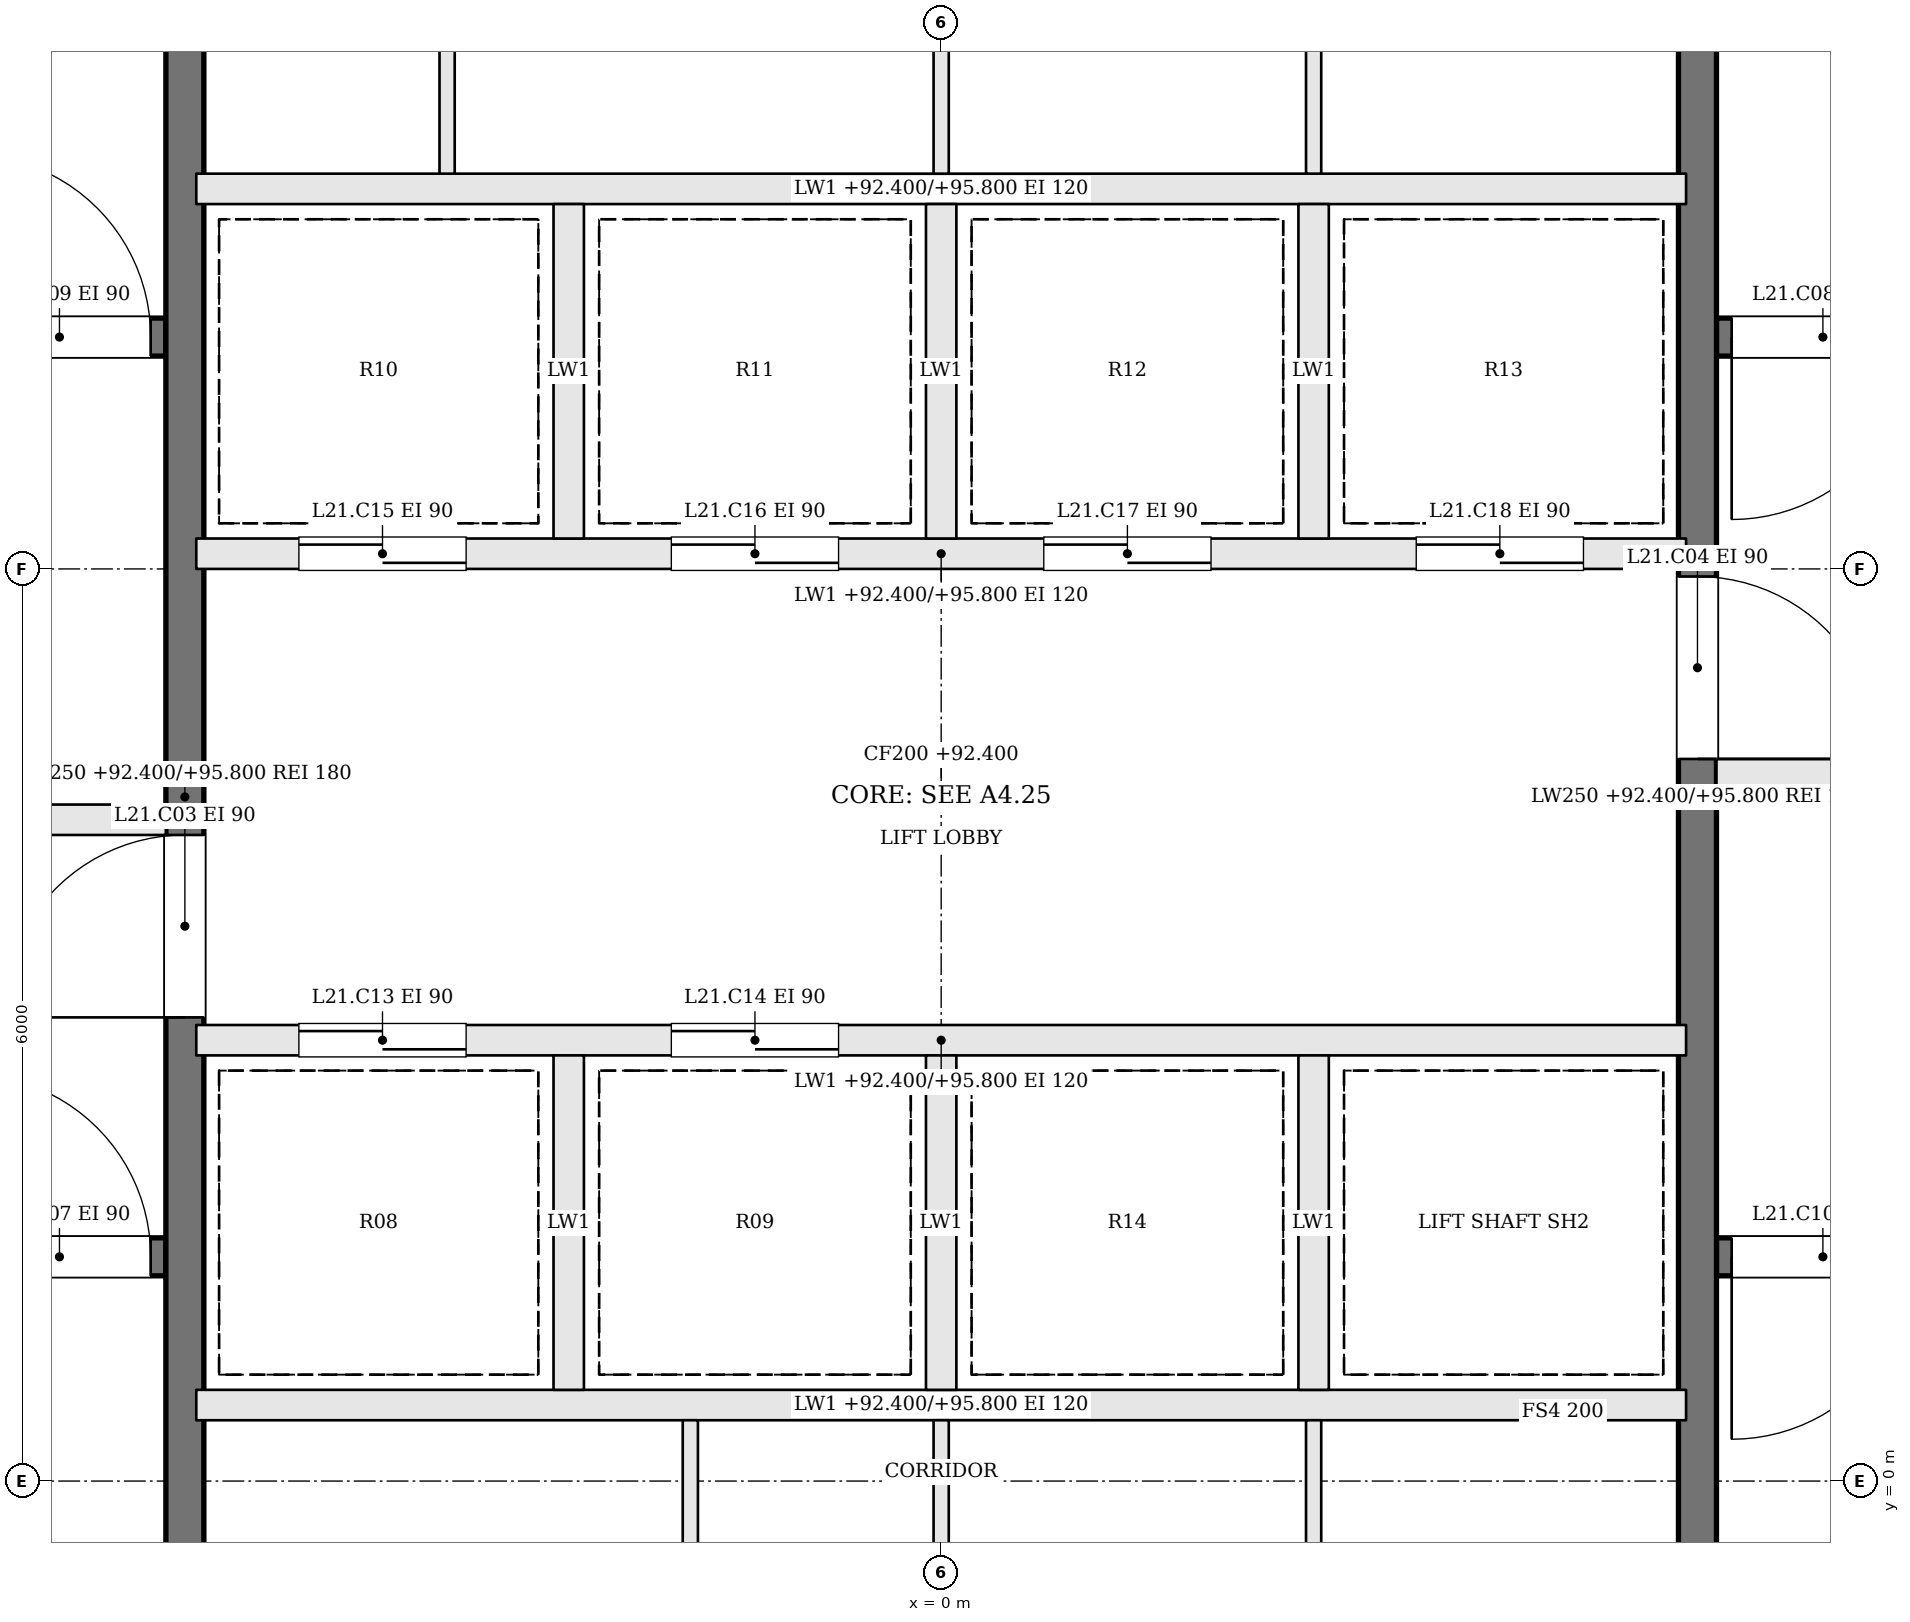
"""IFC4 building model, lengths in metres.
Left out: names, types, materials, properties, quantities, classifications, styles, units other than length and angle.
Written with IfcOpenShell. Run it as: python <this file> out.ifc"""

import sys

from ifc_helpers import new_model, si_unit, direction, frame, frame_2d, origin, place, context, subcontext, project, spatial, rectangle, extrude, element, fill, save


model = new_model("IFC4")
c1 = context("Model", 3, precision=1e-05, world=origin(), true_north=direction((0.0, 1.0)))
c2 = subcontext(c1, "Body", "Model", "MODEL_VIEW")
j1 = project(units=[si_unit("LENGTHUNIT", "METRE"), si_unit("PLANEANGLEUNIT", "RADIAN")], contexts=[c1])
p1 = place(None, origin())
s1 = spatial("IfcSite", under=j1, at=p1, CompositionType="ELEMENT")
p2 = place(p1, origin())
s2 = spatial("IfcBuilding", under=s1, at=p2, CompositionType="ELEMENT")
p3 = place(p2, frame((0.0, 0.0, 92.4)))
s3 = spatial("IfcBuildingStorey", under=s2, at=p3, CompositionType="ELEMENT", Elevation=92.4)
p4 = place(p3, frame((-11.9, 1.475, 0.0), z_axis=(0.0, 0.0, 1.0), x_axis=(1.0, 0.0, 0.0)))
e1 = element("IfcWall", 1, at=p4, inside=s3, PredefinedType="SOLIDWALL", context=c2, shape_type="SweptSolid", body=[
    extrude(rectangle(XDim=6.8, YDim=0.25, at=frame_2d((3.4, 0.0))), origin(), (0.0, 0.0, 1.0), 3.4),
])
p5 = place(p4, frame((5.5, 0.0, 0.0)))
e2 = element("IfcOpeningElement", 2, at=p5, cuts=e1, PredefinedType="OPENING", context=c2, shape_type="SweptSolid", body=[
    extrude(rectangle(XDim=1.2, YDim=2.1, at=frame_2d((0.6, 1.05))), frame((0.0, 0.135, 0.0), z_axis=(0.0, -1.0, 0.0), x_axis=(1.0, 0.0, 0.0)), (0.0, 0.0, 1.0), 0.27),
])
p6 = place(p3, frame((11.9, 7.525, 0.0), z_axis=(0.0, 0.0, 1.0), x_axis=(-1.0, 0.0, 0.0)))
e3 = element("IfcWall", 3, at=p6, inside=s3, PredefinedType="SOLIDWALL", context=c2, shape_type="SweptSolid", body=[
    extrude(rectangle(XDim=6.8, YDim=0.25, at=frame_2d((3.4, 0.0))), origin(), (0.0, 0.0, 1.0), 3.4),
])
p7 = place(p6, frame((5.5, 0.0, 0.0)))
e4 = element("IfcOpeningElement", 4, at=p7, cuts=e3, PredefinedType="OPENING", context=c2, shape_type="SweptSolid", body=[
    extrude(rectangle(XDim=1.2, YDim=2.1, at=frame_2d((0.6, 1.05))), frame((0.0, 0.135, 0.0), z_axis=(0.0, -1.0, 0.0), x_axis=(1.0, 0.0, 0.0)), (0.0, 0.0, 1.0), 0.27),
])
p8 = place(p3, frame((-11.9, 4.35, 0.0), z_axis=(0.0, 0.0, 1.0), x_axis=(1.0, 0.0, 0.0)))
e5 = element("IfcWall", 5, at=p8, inside=s3, PredefinedType="SOLIDWALL", context=c2, shape_type="SweptSolid", body=[
    extrude(rectangle(XDim=6.8, YDim=0.2, at=frame_2d((3.4, 0.0))), origin(), (0.0, 0.0, 1.0), 3.4),
])
p9 = place(p8, frame((4.1, 0.0, 0.0)))
e6 = element("IfcOpeningElement", 6, at=p9, cuts=e5, PredefinedType="OPENING", context=c2, shape_type="SweptSolid", body=[
    extrude(rectangle(XDim=1.2, YDim=2.1, at=frame_2d((0.6, 1.05))), frame((0.0, 0.11, 0.0), z_axis=(0.0, -1.0, 0.0), x_axis=(1.0, 0.0, 0.0)), (0.0, 0.0, 1.0), 0.22),
])
p10 = place(p8, frame((0.8, 0.0, 0.0)))
e7 = element("IfcOpeningElement", 7, at=p10, cuts=e5, PredefinedType="OPENING", context=c2, shape_type="SweptSolid", body=[
    extrude(rectangle(XDim=1.2, YDim=2.1, at=frame_2d((0.6, 1.05))), frame((0.0, 0.11, 0.0), z_axis=(0.0, -1.0, 0.0), x_axis=(1.0, 0.0, 0.0)), (0.0, 0.0, 1.0), 0.22),
])
p11 = place(p3, frame((11.9, 4.65, 0.0), z_axis=(0.0, 0.0, 1.0), x_axis=(-1.0, 0.0, 0.0)))
e8 = element("IfcWall", 8, at=p11, inside=s3, PredefinedType="SOLIDWALL", context=c2, shape_type="SweptSolid", body=[
    extrude(rectangle(XDim=6.8, YDim=0.2, at=frame_2d((3.4, 0.0))), origin(), (0.0, 0.0, 1.0), 3.4),
])
p12 = place(p11, frame((4.1, 0.0, 0.0)))
e9 = element("IfcOpeningElement", 9, at=p12, cuts=e8, PredefinedType="OPENING", context=c2, shape_type="SweptSolid", body=[
    extrude(rectangle(XDim=1.2, YDim=2.1, at=frame_2d((0.6, 1.05))), frame((0.0, 0.11, 0.0), z_axis=(0.0, -1.0, 0.0), x_axis=(1.0, 0.0, 0.0)), (0.0, 0.0, 1.0), 0.22),
])
p13 = place(p11, frame((0.8, 0.0, 0.0)))
e10 = element("IfcOpeningElement", 10, at=p13, cuts=e8, PredefinedType="OPENING", context=c2, shape_type="SweptSolid", body=[
    extrude(rectangle(XDim=1.2, YDim=2.1, at=frame_2d((0.6, 1.05))), frame((0.0, 0.11, 0.0), z_axis=(0.0, -1.0, 0.0), x_axis=(1.0, 0.0, 0.0)), (0.0, 0.0, 1.0), 0.22),
])
p14 = place(p3, frame((-11.9, 7.525, 0.0), z_axis=(0.0, 0.0, 1.0), x_axis=(1.0, 0.0, 0.0)))
e11 = element("IfcWall", 11, at=p14, inside=s3, PredefinedType="SOLIDWALL", context=c2, shape_type="SweptSolid", body=[
    extrude(rectangle(XDim=6.8, YDim=0.25, at=frame_2d((3.4, 0.0))), origin(), (0.0, 0.0, 1.0), 3.4),
])
p15 = place(p14, frame((5.5, 0.0, 0.0)))
e12 = element("IfcOpeningElement", 12, at=p15, cuts=e11, PredefinedType="OPENING", context=c2, shape_type="SweptSolid", body=[
    extrude(rectangle(XDim=1.2, YDim=2.1, at=frame_2d((0.6, 1.05))), frame((0.0, 0.135, 0.0), z_axis=(0.0, -1.0, 0.0), x_axis=(1.0, 0.0, 0.0)), (0.0, 0.0, 1.0), 0.27),
])
p16 = place(p3, frame((11.9, 1.475, 0.0), z_axis=(0.0, 0.0, 1.0), x_axis=(-1.0, 0.0, 0.0)))
e13 = element("IfcWall", 13, at=p16, inside=s3, PredefinedType="SOLIDWALL", context=c2, shape_type="SweptSolid", body=[
    extrude(rectangle(XDim=6.8, YDim=0.25, at=frame_2d((3.4, 0.0))), origin(), (0.0, 0.0, 1.0), 3.4),
])
p17 = place(p16, frame((5.5, 0.0, 0.0)))
e14 = element("IfcOpeningElement", 14, at=p17, cuts=e13, PredefinedType="OPENING", context=c2, shape_type="SweptSolid", body=[
    extrude(rectangle(XDim=1.2, YDim=2.1, at=frame_2d((0.6, 1.05))), frame((0.0, 0.135, 0.0), z_axis=(0.0, -1.0, 0.0), x_axis=(1.0, 0.0, 0.0)), (0.0, 0.0, 1.0), 0.27),
])
p18 = place(p3, frame((-4.975, -1.9, 0.0), z_axis=(0.0, 0.0, 1.0), x_axis=(0.0, 1.0, 0.0)))
e15 = element("IfcWall", 15, at=p18, inside=s3, PredefinedType="SOLIDWALL", context=c2, shape_type="SweptSolid", body=[
    extrude(rectangle(XDim=12.8, YDim=0.25, at=frame_2d((6.4, 0.0))), origin(), (0.0, 0.0, 1.0), 3.4),
])
p19 = place(p18, frame((4.95, 0.0, 0.0)))
e16 = element("IfcOpeningElement", 16, at=p19, cuts=e15, PredefinedType="OPENING", context=c2, shape_type="SweptSolid", body=[
    extrude(rectangle(XDim=1.2, YDim=2.1, at=frame_2d((0.6, 1.05))), frame((0.0, 0.135, 0.0), z_axis=(0.0, -1.0, 0.0), x_axis=(1.0, 0.0, 0.0)), (0.0, 0.0, 1.0), 0.27),
])
p20 = place(p3, frame((4.975, 10.9, 0.0), z_axis=(0.0, 0.0, 1.0), x_axis=(0.0, -1.0, 0.0)))
e17 = element("IfcWall", 17, at=p20, inside=s3, PredefinedType="SOLIDWALL", context=c2, shape_type="SweptSolid", body=[
    extrude(rectangle(XDim=12.8, YDim=0.25, at=frame_2d((6.4, 0.0))), origin(), (0.0, 0.0, 1.0), 3.4),
])
p21 = place(p20, frame((4.95, 0.0, 0.0)))
e18 = element("IfcOpeningElement", 18, at=p21, cuts=e17, PredefinedType="OPENING", context=c2, shape_type="SweptSolid", body=[
    extrude(rectangle(XDim=1.2, YDim=2.1, at=frame_2d((0.6, 1.05))), frame((0.0, 0.135, 0.0), z_axis=(0.0, -1.0, 0.0), x_axis=(1.0, 0.0, 0.0)), (0.0, 0.0, 1.0), 0.27),
])
p22 = place(p3, frame((-4.9, 0.5, 0.0), z_axis=(0.0, 0.0, 1.0), x_axis=(1.0, 0.0, 0.0)))
e19 = element("IfcWall", 19, at=p22, inside=s3, PredefinedType="SOLIDWALL", context=c2, shape_type="SweptSolid", body=[
    extrude(rectangle(XDim=9.8, YDim=0.2, at=frame_2d((4.9, 0.0))), origin(), (0.0, 0.0, 1.0), 3.4),
])
p23 = place(p3, frame((-4.9, 2.9, 0.0), z_axis=(0.0, 0.0, 1.0), x_axis=(1.0, 0.0, 0.0)))
e20 = element("IfcWall", 20, at=p23, inside=s3, PredefinedType="SOLIDWALL", context=c2, shape_type="SweptSolid", body=[
    extrude(rectangle(XDim=9.8, YDim=0.2, at=frame_2d((4.9, 0.0))), origin(), (0.0, 0.0, 1.0), 3.4),
])
p24 = place(p23, frame((0.675, 0.0, 0.0)))
e21 = element("IfcOpeningElement", 21, at=p24, cuts=e20, PredefinedType="OPENING", context=c2, shape_type="SweptSolid", body=[
    extrude(rectangle(XDim=1.1, YDim=2.1, at=frame_2d((0.55, 1.05))), frame((0.0, 0.11, 0.0), z_axis=(0.0, -1.0, 0.0), x_axis=(1.0, 0.0, 0.0)), (0.0, 0.0, 1.0), 0.22),
])
p25 = place(p23, frame((3.125, 0.0, 0.0)))
e22 = element("IfcOpeningElement", 22, at=p25, cuts=e20, PredefinedType="OPENING", context=c2, shape_type="SweptSolid", body=[
    extrude(rectangle(XDim=1.1, YDim=2.1, at=frame_2d((0.55, 1.05))), frame((0.0, 0.11, 0.0), z_axis=(0.0, -1.0, 0.0), x_axis=(1.0, 0.0, 0.0)), (0.0, 0.0, 1.0), 0.22),
])
p26 = place(p3, frame((-4.9, 6.1, 0.0), z_axis=(0.0, 0.0, 1.0), x_axis=(1.0, 0.0, 0.0)))
e23 = element("IfcWall", 23, at=p26, inside=s3, PredefinedType="SOLIDWALL", context=c2, shape_type="SweptSolid", body=[
    extrude(rectangle(XDim=9.8, YDim=0.2, at=frame_2d((4.9, 0.0))), origin(), (0.0, 0.0, 1.0), 3.4),
])
p27 = place(p26, frame((0.675, 0.0, 0.0)))
e24 = element("IfcOpeningElement", 24, at=p27, cuts=e23, PredefinedType="OPENING", context=c2, shape_type="SweptSolid", body=[
    extrude(rectangle(XDim=1.1, YDim=2.1, at=frame_2d((0.55, 1.05))), frame((0.0, 0.11, 0.0), z_axis=(0.0, -1.0, 0.0), x_axis=(1.0, 0.0, 0.0)), (0.0, 0.0, 1.0), 0.22),
])
p28 = place(p26, frame((3.125, 0.0, 0.0)))
e25 = element("IfcOpeningElement", 25, at=p28, cuts=e23, PredefinedType="OPENING", context=c2, shape_type="SweptSolid", body=[
    extrude(rectangle(XDim=1.1, YDim=2.1, at=frame_2d((0.55, 1.05))), frame((0.0, 0.11, 0.0), z_axis=(0.0, -1.0, 0.0), x_axis=(1.0, 0.0, 0.0)), (0.0, 0.0, 1.0), 0.22),
])
p29 = place(p26, frame((5.575, 0.0, 0.0)))
e26 = element("IfcOpeningElement", 26, at=p29, cuts=e23, PredefinedType="OPENING", context=c2, shape_type="SweptSolid", body=[
    extrude(rectangle(XDim=1.1, YDim=2.1, at=frame_2d((0.55, 1.05))), frame((0.0, 0.11, 0.0), z_axis=(0.0, -1.0, 0.0), x_axis=(1.0, 0.0, 0.0)), (0.0, 0.0, 1.0), 0.22),
])
p30 = place(p26, frame((8.025, 0.0, 0.0)))
e27 = element("IfcOpeningElement", 27, at=p30, cuts=e23, PredefinedType="OPENING", context=c2, shape_type="SweptSolid", body=[
    extrude(rectangle(XDim=1.1, YDim=2.1, at=frame_2d((0.55, 1.05))), frame((0.0, 0.11, 0.0), z_axis=(0.0, -1.0, 0.0), x_axis=(1.0, 0.0, 0.0)), (0.0, 0.0, 1.0), 0.22),
])
p31 = place(p3, frame((-4.9, 8.5, 0.0), z_axis=(0.0, 0.0, 1.0), x_axis=(1.0, 0.0, 0.0)))
e28 = element("IfcWall", 28, at=p31, inside=s3, PredefinedType="SOLIDWALL", context=c2, shape_type="SweptSolid", body=[
    extrude(rectangle(XDim=9.8, YDim=0.2, at=frame_2d((4.9, 0.0))), origin(), (0.0, 0.0, 1.0), 3.4),
])
for number, where, z_axis, x_axis in (
    (29, (-2.45, 0.6, 0.0), (0.0, 0.0, 1.0), (0.0, 1.0, 0.0)),
    (30, (0.0, 0.6, 0.0), (0.0, 0.0, 1.0), (0.0, 1.0, 0.0)),
    (31, (2.45, 0.6, 0.0), (0.0, 0.0, 1.0), (0.0, 1.0, 0.0)),
    (32, (-2.45, 6.2, 0.0), (0.0, 0.0, 1.0), (0.0, 1.0, 0.0)),
    (33, (0.0, 6.2, 0.0), (0.0, 0.0, 1.0), (0.0, 1.0, 0.0)),
    (34, (2.45, 6.2, 0.0), (0.0, 0.0, 1.0), (0.0, 1.0, 0.0)),
):
    element("IfcWall", number, at=place(p3, frame(where, z_axis=z_axis, x_axis=x_axis)), inside=s3, PredefinedType="SOLIDWALL", context=c2, shape_type="SweptSolid", body=[
        extrude(rectangle(XDim=2.2, YDim=0.2, at=frame_2d((1.1, 0.0))), origin(), (0.0, 0.0, 1.0), 3.4),
    ])
for number, where, z_axis, x_axis in (
    (35, (-1.65, -1.9, 0.0), (0.0, 0.0, 1.0), (0.0, 1.0, 0.0)),
    (36, (0.0, -1.9, 0.0), (0.0, 0.0, 1.0), (0.0, 1.0, 0.0)),
    (37, (2.45, -1.9, 0.0), (0.0, 0.0, 1.0), (0.0, 1.0, 0.0)),
    (38, (-3.25, 8.6, 0.0), (0.0, 0.0, 1.0), (0.0, 1.0, 0.0)),
    (39, (0.0, 8.6, 0.0), (0.0, 0.0, 1.0), (0.0, 1.0, 0.0)),
    (40, (2.45, 8.6, 0.0), (0.0, 0.0, 1.0), (0.0, 1.0, 0.0)),
):
    element("IfcWall", number, at=place(p3, frame(where, z_axis=z_axis, x_axis=x_axis)), inside=s3, PredefinedType="PARTITIONING", context=c2, shape_type="SweptSolid", body=[
        extrude(rectangle(XDim=2.3, YDim=0.1, at=frame_2d((1.15, 0.0))), origin(), (0.0, 0.0, 1.0), 3.4),
    ])
p32 = place(p19, origin())
e41 = element("IfcDoor", 41, at=p32, inside=s3, OperationType="SINGLE_SWING_LEFT", PredefinedType="DOOR", context=c2, shape_type="SweptSolid", body=[
    extrude(rectangle(XDim=1.2, YDim=2.1, at=frame_2d((0.6, 1.05))), frame((0.0, 0.025, 0.0), z_axis=(0.0, -1.0, 0.0), x_axis=(1.0, 0.0, 0.0)), (0.0, 0.0, 1.0), 0.05),
])
fill(e16, e41)
p33 = place(p21, origin())
e42 = element("IfcDoor", 42, at=p33, inside=s3, OperationType="SINGLE_SWING_RIGHT", PredefinedType="DOOR", context=c2, shape_type="SweptSolid", body=[
    extrude(rectangle(XDim=1.2, YDim=2.1, at=frame_2d((0.6, 1.05))), frame((0.0, 0.025, 0.0), z_axis=(0.0, -1.0, 0.0), x_axis=(1.0, 0.0, 0.0)), (0.0, 0.0, 1.0), 0.05),
])
fill(e18, e42)
p34 = place(p5, origin())
e43 = element("IfcDoor", 43, at=p34, inside=s3, OperationType="SINGLE_SWING_LEFT", PredefinedType="DOOR", context=c2, shape_type="SweptSolid", body=[
    extrude(rectangle(XDim=1.2, YDim=2.1, at=frame_2d((0.6, 1.05))), frame((0.0, 0.025, 0.0), z_axis=(0.0, -1.0, 0.0), x_axis=(1.0, 0.0, 0.0)), (0.0, 0.0, 1.0), 0.05),
])
fill(e2, e43)
p35 = place(p7, origin())
e44 = element("IfcDoor", 44, at=p35, inside=s3, OperationType="SINGLE_SWING_RIGHT", PredefinedType="DOOR", context=c2, shape_type="SweptSolid", body=[
    extrude(rectangle(XDim=1.2, YDim=2.1, at=frame_2d((0.6, 1.05))), frame((0.0, 0.025, 0.0), z_axis=(0.0, -1.0, 0.0), x_axis=(1.0, 0.0, 0.0)), (0.0, 0.0, 1.0), 0.05),
])
fill(e4, e44)
p36 = place(p15, origin())
e45 = element("IfcDoor", 45, at=p36, inside=s3, OperationType="SINGLE_SWING_LEFT", PredefinedType="DOOR", context=c2, shape_type="SweptSolid", body=[
    extrude(rectangle(XDim=1.2, YDim=2.1, at=frame_2d((0.6, 1.05))), frame((0.0, 0.025, 0.0), z_axis=(0.0, -1.0, 0.0), x_axis=(1.0, 0.0, 0.0)), (0.0, 0.0, 1.0), 0.05),
])
fill(e12, e45)
p37 = place(p17, origin())
e46 = element("IfcDoor", 46, at=p37, inside=s3, OperationType="SINGLE_SWING_RIGHT", PredefinedType="DOOR", context=c2, shape_type="SweptSolid", body=[
    extrude(rectangle(XDim=1.2, YDim=2.1, at=frame_2d((0.6, 1.05))), frame((0.0, 0.025, 0.0), z_axis=(0.0, -1.0, 0.0), x_axis=(1.0, 0.0, 0.0)), (0.0, 0.0, 1.0), 0.05),
])
fill(e14, e46)
p38 = place(p24, origin())
e47 = element("IfcDoor", 47, at=p38, inside=s3, OperationType="SLIDING_TO_RIGHT", PredefinedType="DOOR", context=c2, shape_type="SweptSolid", body=[
    extrude(rectangle(XDim=1.1, YDim=2.1, at=frame_2d((0.55, 1.05))), frame((0.0, 0.025, 0.0), z_axis=(0.0, -1.0, 0.0), x_axis=(1.0, 0.0, 0.0)), (0.0, 0.0, 1.0), 0.05),
])
fill(e21, e47)
p39 = place(p25, origin())
e48 = element("IfcDoor", 48, at=p39, inside=s3, OperationType="SLIDING_TO_LEFT", PredefinedType="DOOR", context=c2, shape_type="SweptSolid", body=[
    extrude(rectangle(XDim=1.1, YDim=2.1, at=frame_2d((0.55, 1.05))), frame((0.0, 0.025, 0.0), z_axis=(0.0, -1.0, 0.0), x_axis=(1.0, 0.0, 0.0)), (0.0, 0.0, 1.0), 0.05),
])
fill(e22, e48)
p40 = place(p27, origin())
e49 = element("IfcDoor", 49, at=p40, inside=s3, OperationType="SLIDING_TO_RIGHT", PredefinedType="DOOR", context=c2, shape_type="SweptSolid", body=[
    extrude(rectangle(XDim=1.1, YDim=2.1, at=frame_2d((0.55, 1.05))), frame((0.0, 0.025, 0.0), z_axis=(0.0, -1.0, 0.0), x_axis=(1.0, 0.0, 0.0)), (0.0, 0.0, 1.0), 0.05),
])
fill(e24, e49)
p41 = place(p28, origin())
e50 = element("IfcDoor", 50, at=p41, inside=s3, OperationType="SLIDING_TO_LEFT", PredefinedType="DOOR", context=c2, shape_type="SweptSolid", body=[
    extrude(rectangle(XDim=1.1, YDim=2.1, at=frame_2d((0.55, 1.05))), frame((0.0, 0.025, 0.0), z_axis=(0.0, -1.0, 0.0), x_axis=(1.0, 0.0, 0.0)), (0.0, 0.0, 1.0), 0.05),
])
fill(e25, e50)
p42 = place(p29, origin())
e51 = element("IfcDoor", 51, at=p42, inside=s3, OperationType="SLIDING_TO_RIGHT", PredefinedType="DOOR", context=c2, shape_type="SweptSolid", body=[
    extrude(rectangle(XDim=1.1, YDim=2.1, at=frame_2d((0.55, 1.05))), frame((0.0, 0.025, 0.0), z_axis=(0.0, -1.0, 0.0), x_axis=(1.0, 0.0, 0.0)), (0.0, 0.0, 1.0), 0.05),
])
fill(e26, e51)
p43 = place(p30, origin())
e52 = element("IfcDoor", 52, at=p43, inside=s3, OperationType="SLIDING_TO_LEFT", PredefinedType="DOOR", context=c2, shape_type="SweptSolid", body=[
    extrude(rectangle(XDim=1.1, YDim=2.1, at=frame_2d((0.55, 1.05))), frame((0.0, 0.025, 0.0), z_axis=(0.0, -1.0, 0.0), x_axis=(1.0, 0.0, 0.0)), (0.0, 0.0, 1.0), 0.05),
])
fill(e27, e52)
save(model, sys.argv[1])
